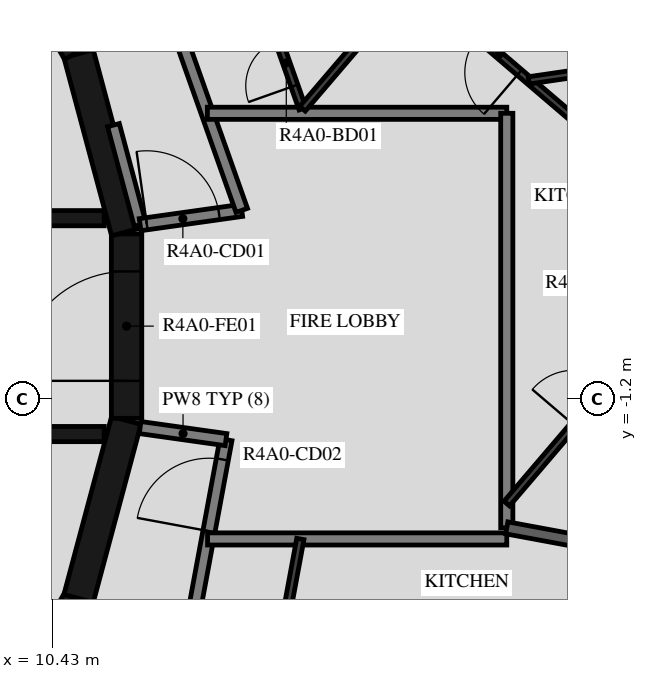
"""IFC4 building model, lengths in metres.
Left out: names, types, materials, properties, quantities, classifications, styles, units other than length and angle.
Written with IfcOpenShell. Run it as: python <this file> out.ifc"""

import sys

from ifc_helpers import new_model, si_unit, direction, frame, frame_2d, origin, place, context, subcontext, project, spatial, rectangle, extrude, element, fill, save


model = new_model("IFC4")
c1 = context("Model", 3, precision=1e-05, world=origin(), true_north=direction((0.0, 1.0)))
c2 = subcontext(c1, "Body", "Model", "MODEL_VIEW")
j1 = project(units=[si_unit("LENGTHUNIT", "METRE"), si_unit("PLANEANGLEUNIT", "RADIAN")], contexts=[c1])
p1 = place(None, origin())
s1 = spatial("IfcSite", under=j1, at=p1, CompositionType="ELEMENT")
p2 = place(p1, origin())
s2 = spatial("IfcBuilding", under=s1, at=p2, CompositionType="ELEMENT")
p3 = place(p2, frame((0.0, 0.0, 151.7)))
s3 = spatial("IfcBuildingStorey", under=s2, at=p3, CompositionType="ELEMENT", Elevation=151.7)
for number, where, z_axis, x_axis in (
    (1, (9.329, -7.137, 0.0), (0.0, 0.0, 1.0), (0.5, 0.866, 0.0)),
    (2, (10.858, -4.479, 0.0), (0.0, 0.0, 1.0), (0.259, 0.966, 0.0)),
):
    element("IfcWall", number, at=place(p3, frame(where, z_axis=z_axis, x_axis=x_axis)), inside=s3, PredefinedType="SHEAR", context=c2, shape_type="SweptSolid", body=[
        extrude(rectangle(XDim=3.033, YDim=0.5, at=frame_2d((1.516, 0.0))), origin(), (0.0, 0.0, 1.0), 3.12),
    ])
p4 = place(p3, frame((11.647, -1.516, 0.0), z_axis=(0.0, 0.0, 1.0), x_axis=(0.0, 1.0, 0.0)))
e3 = element("IfcWall", 3, at=p4, inside=s3, PredefinedType="SHEAR", context=c2, shape_type="SweptSolid", body=[
    extrude(rectangle(XDim=3.033, YDim=0.5, at=frame_2d((1.516, 0.0))), origin(), (0.0, 0.0, 1.0), 3.12),
])
p5 = place(p4, frame((0.616, 0.0, 0.0)))
e4 = element("IfcOpeningElement", 4, at=p5, cuts=e3, PredefinedType="OPENING", context=c2, shape_type="SweptSolid", body=[
    extrude(rectangle(XDim=1.8, YDim=2.1, at=frame_2d((0.9, 1.05))), frame((0.0, 0.26, 0.0), z_axis=(0.0, -1.0, 0.0), x_axis=(1.0, 0.0, 0.0)), (0.0, 0.0, 1.0), 0.52),
])
for number, where, z_axis, x_axis in (
    (5, (11.643, 1.55, 0.0), (0.0, 0.0, 1.0), (-0.259, 0.966, 0.0)),
    (6, (10.845, 4.51, 0.0), (0.0, 0.0, 1.0), (-0.5, 0.866, 0.0)),
):
    element("IfcWall", number, at=place(p3, frame(where, z_axis=z_axis, x_axis=x_axis)), inside=s3, PredefinedType="SHEAR", context=c2, shape_type="SweptSolid", body=[
        extrude(rectangle(XDim=3.033, YDim=0.5, at=frame_2d((1.516, 0.0))), origin(), (0.0, 0.0, 1.0), 3.12),
    ])
p6 = place(p3, frame((3.35, 1.775, 0.0), z_axis=(0.0, 0.0, 1.0), x_axis=(1.0, 0.0, 0.0)))
e7 = element("IfcWall", 7, at=p6, inside=s3, PredefinedType="SHEAR", context=c2, shape_type="SweptSolid", body=[
    extrude(rectangle(XDim=7.93, YDim=0.25, at=frame_2d((3.965, 0.0))), origin(), (0.0, 0.0, 1.0), 3.12),
])
p7 = place(p6, frame((0.35, 0.0, 0.0)))
e8 = element("IfcOpeningElement", 8, at=p7, cuts=e7, PredefinedType="OPENING", context=c2, shape_type="SweptSolid", body=[
    extrude(rectangle(XDim=1.2, YDim=2.4, at=frame_2d((0.6, 1.2))), frame((0.0, 0.135, 0.0), z_axis=(0.0, -1.0, 0.0), x_axis=(1.0, 0.0, 0.0)), (0.0, 0.0, 1.0), 0.27),
])
p8 = place(p6, frame((2.5, 0.0, 0.0)))
e9 = element("IfcOpeningElement", 9, at=p8, cuts=e7, PredefinedType="OPENING", context=c2, shape_type="SweptSolid", body=[
    extrude(rectangle(XDim=1.2, YDim=2.4, at=frame_2d((0.6, 1.2))), frame((0.0, 0.135, 0.0), z_axis=(0.0, -1.0, 0.0), x_axis=(1.0, 0.0, 0.0)), (0.0, 0.0, 1.0), 0.27),
])
p9 = place(p6, frame((4.8, 0.0, 0.0)))
e10 = element("IfcOpeningElement", 10, at=p9, cuts=e7, PredefinedType="OPENING", context=c2, shape_type="SweptSolid", body=[
    extrude(rectangle(XDim=0.9, YDim=2.1, at=frame_2d((0.45, 1.05))), frame((0.0, 0.135, 0.0), z_axis=(0.0, -1.0, 0.0), x_axis=(1.0, 0.0, 0.0)), (0.0, 0.0, 1.0), 0.27),
])
p10 = place(p3, frame((3.35, -1.775, 0.0), z_axis=(0.0, 0.0, 1.0), x_axis=(1.0, 0.0, 0.0)))
e11 = element("IfcWall", 11, at=p10, inside=s3, PredefinedType="SHEAR", context=c2, shape_type="SweptSolid", body=[
    extrude(rectangle(XDim=7.93, YDim=0.25, at=frame_2d((3.965, 0.0))), origin(), (0.0, 0.0, 1.0), 3.12),
])
p11 = place(p10, frame((0.4, 0.0, 0.0)))
e12 = element("IfcOpeningElement", 12, at=p11, cuts=e11, PredefinedType="OPENING", context=c2, shape_type="SweptSolid", body=[
    extrude(rectangle(XDim=1.1, YDim=2.4, at=frame_2d((0.55, 1.2))), frame((0.0, 0.135, 0.0), z_axis=(0.0, -1.0, 0.0), x_axis=(1.0, 0.0, 0.0)), (0.0, 0.0, 1.0), 0.27),
])
p12 = place(p10, frame((2.55, 0.0, 0.0)))
e13 = element("IfcOpeningElement", 13, at=p12, cuts=e11, PredefinedType="OPENING", context=c2, shape_type="SweptSolid", body=[
    extrude(rectangle(XDim=1.1, YDim=2.4, at=frame_2d((0.55, 1.2))), frame((0.0, 0.135, 0.0), z_axis=(0.0, -1.0, 0.0), x_axis=(1.0, 0.0, 0.0)), (0.0, 0.0, 1.0), 0.27),
])
p13 = place(p10, frame((4.7, 0.0, 0.0)))
e14 = element("IfcOpeningElement", 14, at=p13, cuts=e11, PredefinedType="OPENING", context=c2, shape_type="SweptSolid", body=[
    extrude(rectangle(XDim=1.1, YDim=2.4, at=frame_2d((0.55, 1.2))), frame((0.0, 0.135, 0.0), z_axis=(0.0, -1.0, 0.0), x_axis=(1.0, 0.0, 0.0)), (0.0, 0.0, 1.0), 0.27),
])
p14 = place(p3, frame((11.87, 1.668, 0.0), z_axis=(0.0, 0.0, 1.0), x_axis=(-0.258836880648, 0.965921047093, 0.0)))
e15 = element("IfcWall", 15, at=p14, inside=s3, PredefinedType="STANDARD", context=c2, shape_type="SweptSolid", body=[
    extrude(rectangle(XDim=1.695, YDim=0.2, at=frame_2d((0.848, 0.0))), origin(), (0.0, 0.0, 1.0), 3.12),
])
p15 = place(p3, frame((11.87, 1.668, 0.0), z_axis=(0.0, 0.0, 1.0), x_axis=(0.990270910415, 0.139152879904, 0.0)))
e16 = element("IfcWall", 16, at=p15, inside=s3, PredefinedType="STANDARD", context=c2, shape_type="SweptSolid", body=[
    extrude(rectangle(XDim=1.688, YDim=0.2, at=frame_2d((0.844, 0.0))), origin(), (0.0, 0.0, 1.0), 3.12),
])
p16 = place(p15, frame((0.11, 0.0, 0.0)))
e17 = element("IfcOpeningElement", 17, at=p16, cuts=e16, PredefinedType="OPENING", context=c2, shape_type="SweptSolid", body=[
    extrude(rectangle(XDim=1.2, YDim=2.1, at=frame_2d((0.6, 1.05))), frame((0.0, 0.11, 0.0), z_axis=(0.0, -1.0, 0.0), x_axis=(1.0, 0.0, 0.0)), (0.0, 0.0, 1.0), 0.22),
])
p17 = place(p3, frame((13.542, 1.903, 0.0), z_axis=(0.0, 0.0, 1.0), x_axis=(-0.333808508206, 0.942640907159, 0.0)))
e18 = element("IfcWall", 18, at=p17, inside=s3, PredefinedType="STANDARD", context=c2, shape_type="SweptSolid", body=[
    extrude(rectangle(XDim=6.317, YDim=0.2, at=frame_2d((3.158, 0.0))), origin(), (0.0, 0.0, 1.0), 3.12),
])
p18 = place(p3, frame((12.521, -5.972, 0.0), z_axis=(0.0, 0.0, 1.0), x_axis=(0.182244189886, 0.983253301674, 0.0)))
e19 = element("IfcWall", 19, at=p18, inside=s3, PredefinedType="STANDARD", context=c2, shape_type="SweptSolid", body=[
    extrude(rectangle(XDim=4.176, YDim=0.2, at=frame_2d((2.088, 0.0))), origin(), (0.0, 0.0, 1.0), 3.12),
])
p19 = place(p18, frame((2.645, 0.0, 0.0)))
e20 = element("IfcOpeningElement", 20, at=p19, cuts=e19, PredefinedType="OPENING", context=c2, shape_type="SweptSolid", body=[
    extrude(rectangle(XDim=1.2, YDim=2.1, at=frame_2d((0.6, 1.05))), frame((0.0, 0.11, 0.0), z_axis=(0.0, -1.0, 0.0), x_axis=(1.0, 0.0, 0.0)), (0.0, 0.0, 1.0), 0.22),
])
p20 = place(p3, frame((13.282, -1.867, 0.0), z_axis=(0.0, 0.0, 1.0), x_axis=(-0.990265430288, 0.139191873241, 0.0)))
e21 = element("IfcWall", 21, at=p20, inside=s3, PredefinedType="STANDARD", context=c2, shape_type="SweptSolid", body=[
    extrude(rectangle(XDim=1.426, YDim=0.2, at=frame_2d((0.713, 0.0))), origin(), (0.0, 0.0, 1.0), 3.12),
])
p21 = place(p3, frame((17.9, 3.5, 0.0), z_axis=(0.0, 0.0, 1.0), x_axis=(-1.0, 0.0, 0.0)))
e22 = element("IfcWall", 22, at=p21, inside=s3, PredefinedType="STANDARD", context=c2, shape_type="SweptSolid", body=[
    extrude(rectangle(XDim=4.924, YDim=0.2, at=frame_2d((2.462, 0.0))), origin(), (0.0, 0.0, 1.0), 3.12),
])
p22 = place(p3, frame((17.9, -3.318, 0.0), z_axis=(0.0, 0.0, 1.0), x_axis=(0.0, 1.0, 0.0)))
e23 = element("IfcWall", 23, at=p22, inside=s3, PredefinedType="STANDARD", context=c2, shape_type="SweptSolid", body=[
    extrude(rectangle(XDim=6.818, YDim=0.2, at=frame_2d((3.409, 0.0))), origin(), (0.0, 0.0, 1.0), 3.12),
])
p23 = place(p3, frame((12.979, -3.5, 0.0), z_axis=(0.0, 0.0, 1.0), x_axis=(1.0, 0.0, 0.0)))
e24 = element("IfcWall", 24, at=p23, inside=s3, PredefinedType="STANDARD", context=c2, shape_type="SweptSolid", body=[
    extrude(rectangle(XDim=4.92, YDim=0.2, at=frame_2d((2.46, 0.0))), origin(), (0.0, 0.0, 1.0), 3.12),
])
p24 = place(p3, frame((17.9, -3.318, 0.0), z_axis=(0.0, 0.0, 1.0), x_axis=(0.983252800712, -0.182246892682, 0.0)))
e25 = element("IfcWall", 25, at=p24, inside=s3, PredefinedType="STANDARD", context=c2, shape_type="SweptSolid", body=[
    extrude(rectangle(XDim=1.386, YDim=0.2, at=frame_2d((0.693, 0.0))), origin(), (0.0, 0.0, 1.0), 3.12),
])
p25 = place(p3, frame((14.541, 3.575, 0.0), z_axis=(0.0, 0.0, 1.0), x_axis=(-0.333799280318, 0.942644174893, 0.0)))
e26 = element("IfcWall", 26, at=p25, inside=s3, PredefinedType="PARTITIONING", context=c2, shape_type="SweptSolid", body=[
    extrude(rectangle(XDim=5.477, YDim=0.12, at=frame_2d((2.738, 0.0))), origin(), (0.0, 0.0, 1.0), 3.12),
])
p26 = place(p25, frame((0.4, 0.0, 0.0)))
e27 = element("IfcOpeningElement", 27, at=p26, cuts=e26, PredefinedType="OPENING", context=c2, shape_type="SweptSolid", body=[
    extrude(rectangle(XDim=0.8, YDim=2.1, at=frame_2d((0.4, 1.05))), frame((0.0, 0.07, 0.0), z_axis=(0.0, -1.0, 0.0), x_axis=(1.0, 0.0, 0.0)), (0.0, 0.0, 1.0), 0.14),
])
p27 = place(p3, frame((23.411, -0.357, 0.0), z_axis=(0.0, 0.0, 1.0), x_axis=(-0.76041871148, 0.649433124525, 0.0)))
e28 = element("IfcWall", 28, at=p27, inside=s3, PredefinedType="PARTITIONING", context=c2, shape_type="SweptSolid", body=[
    extrude(rectangle(XDim=9.259, YDim=0.12, at=frame_2d((4.629, 0.0))), origin(), (0.0, 0.0, 1.0), 3.12),
])
p28 = place(p27, frame((6.972, 0.0, 0.0)))
e29 = element("IfcOpeningElement", 29, at=p28, cuts=e28, PredefinedType="OPENING", context=c2, shape_type="SweptSolid", body=[
    extrude(rectangle(XDim=0.9, YDim=2.1, at=frame_2d((0.45, 1.05))), frame((0.0, 0.07, 0.0), z_axis=(0.0, -1.0, 0.0), x_axis=(1.0, 0.0, 0.0)), (0.0, 0.0, 1.0), 0.14),
])
p29 = place(p27, frame((0.2, 0.0, 0.0)))
e30 = element("IfcOpeningElement", 30, at=p29, cuts=e28, PredefinedType="OPENING", context=c2, shape_type="SweptSolid", body=[
    extrude(rectangle(XDim=0.9, YDim=2.1, at=frame_2d((0.45, 1.05))), frame((0.0, 0.07, 0.0), z_axis=(0.0, -1.0, 0.0), x_axis=(1.0, 0.0, 0.0)), (0.0, 0.0, 1.0), 0.14),
])
p30 = place(p3, frame((16.341, 5.682, 0.0), z_axis=(0.0, 0.0, 1.0), x_axis=(-0.64946993237, -0.76038727432, 0.0)))
e31 = element("IfcWall", 31, at=p30, inside=s3, PredefinedType="PARTITIONING", context=c2, shape_type="SweptSolid", body=[
    extrude(rectangle(XDim=2.771, YDim=0.12, at=frame_2d((1.386, 0.0))), origin(), (0.0, 0.0, 1.0), 3.12),
])
p31 = place(p3, frame((17.9, -2.918, 0.0), z_axis=(0.0, 0.0, 1.0), x_axis=(0.649469887983, 0.760387312232, 0.0)))
e32 = element("IfcWall", 32, at=p31, inside=s3, PredefinedType="PARTITIONING", context=c2, shape_type="SweptSolid", body=[
    extrude(rectangle(XDim=5.527, YDim=0.12, at=frame_2d((2.763, 0.0))), origin(), (0.0, 0.0, 1.0), 3.12),
])
p32 = place(p31, frame((1.7, 0.0, 0.0)))
e33 = element("IfcOpeningElement", 33, at=p32, cuts=e32, PredefinedType="OPENING", context=c2, shape_type="SweptSolid", body=[
    extrude(rectangle(XDim=0.9, YDim=2.1, at=frame_2d((0.45, 1.05))), frame((0.0, 0.07, 0.0), z_axis=(0.0, -1.0, 0.0), x_axis=(1.0, 0.0, 0.0)), (0.0, 0.0, 1.0), 0.14),
])
p33 = place(p3, frame((22.994, 4.734, 0.0), z_axis=(0.0, 0.0, 1.0), x_axis=(-0.989449286977, -0.144879634529, 0.0)))
e34 = element("IfcWall", 34, at=p33, inside=s3, PredefinedType="PARTITIONING", context=c2, shape_type="SweptSolid", body=[
    extrude(rectangle(XDim=4.782, YDim=0.12, at=frame_2d((2.391, 0.0))), origin(), (0.0, 0.0, 1.0), 3.12),
])
p34 = place(p33, frame((0.7, 0.0, 0.0)))
e35 = element("IfcOpeningElement", 35, at=p34, cuts=e34, PredefinedType="OPENING", context=c2, shape_type="SweptSolid", body=[
    extrude(rectangle(XDim=0.9, YDim=2.1, at=frame_2d((0.45, 1.05))), frame((0.0, 0.07, 0.0), z_axis=(0.0, -1.0, 0.0), x_axis=(1.0, 0.0, 0.0)), (0.0, 0.0, 1.0), 0.14),
])
p35 = place(p3, frame((14.24, -4.928, 0.0), z_axis=(0.0, 0.0, 1.0), x_axis=(0.182329957282, 0.983237400976, 0.0)))
e36 = element("IfcWall", 36, at=p35, inside=s3, PredefinedType="PARTITIONING", context=c2, shape_type="SweptSolid", body=[
    extrude(rectangle(XDim=1.453, YDim=0.12, at=frame_2d((0.727, 0.0))), origin(), (0.0, 0.0, 1.0), 3.12),
])
p36 = place(p5, origin())
e37 = element("IfcDoor", 37, at=p36, inside=s3, OperationType="DOUBLE_DOOR_SINGLE_SWING", PredefinedType="DOOR", context=c2, shape_type="SweptSolid", body=[
    extrude(rectangle(XDim=1.8, YDim=2.1, at=frame_2d((0.9, 1.05))), frame((0.0, 0.025, 0.0), z_axis=(0.0, -1.0, 0.0), x_axis=(1.0, 0.0, 0.0)), (0.0, 0.0, 1.0), 0.05),
])
fill(e4, e37)
p37 = place(p26, origin())
e38 = element("IfcDoor", 38, at=p37, inside=s3, OperationType="SINGLE_SWING_LEFT", PredefinedType="DOOR", context=c2, shape_type="SweptSolid", body=[
    extrude(rectangle(XDim=0.8, YDim=2.1, at=frame_2d((0.4, 1.05))), frame((0.0, 0.025, 0.0), z_axis=(0.0, -1.0, 0.0), x_axis=(1.0, 0.0, 0.0)), (0.0, 0.0, 1.0), 0.05),
])
fill(e27, e38)
p38 = place(p28, origin())
e39 = element("IfcDoor", 39, at=p38, inside=s3, OperationType="SINGLE_SWING_RIGHT", PredefinedType="DOOR", context=c2, shape_type="SweptSolid", body=[
    extrude(rectangle(XDim=0.9, YDim=2.1, at=frame_2d((0.45, 1.05))), frame((0.0, 0.025, 0.0), z_axis=(0.0, -1.0, 0.0), x_axis=(1.0, 0.0, 0.0)), (0.0, 0.0, 1.0), 0.05),
])
fill(e29, e39)
p39 = place(p16, origin())
e40 = element("IfcDoor", 40, at=p39, inside=s3, OperationType="DOUBLE_DOOR_SINGLE_SWING", PredefinedType="DOOR", context=c2, shape_type="SweptSolid", body=[
    extrude(rectangle(XDim=1.2, YDim=2.1, at=frame_2d((0.6, 1.05))), frame((0.0, 0.025, 0.0), z_axis=(0.0, -1.0, 0.0), x_axis=(1.0, 0.0, 0.0)), (0.0, 0.0, 1.0), 0.05),
])
fill(e17, e40)
p40 = place(p19, origin())
e41 = element("IfcDoor", 41, at=p40, inside=s3, OperationType="DOUBLE_DOOR_SINGLE_SWING", PredefinedType="DOOR", context=c2, shape_type="SweptSolid", body=[
    extrude(rectangle(XDim=1.2, YDim=2.1, at=frame_2d((0.6, 1.05))), frame((0.0, 0.025, 0.0), z_axis=(0.0, -1.0, 0.0), x_axis=(1.0, 0.0, 0.0)), (0.0, 0.0, 1.0), 0.05),
])
fill(e20, e41)
save(model, sys.argv[1])
